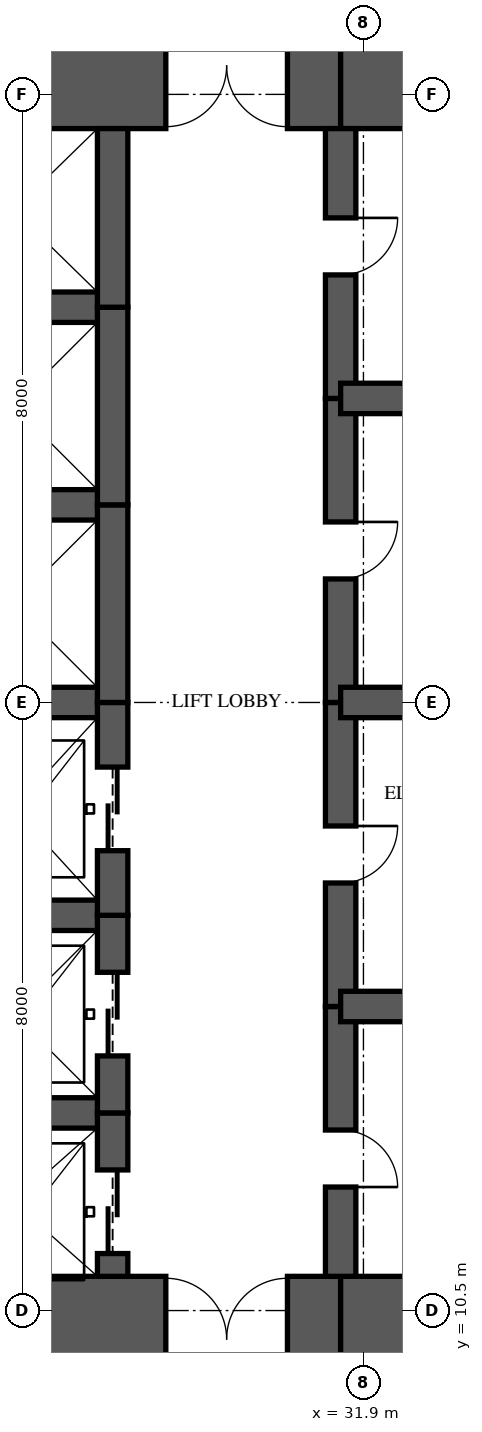
"""IFC4 building model, lengths in metres.
Left out: names, types, materials, properties, quantities, classifications, styles, units other than length and angle.
Written with IfcOpenShell. Run it as: python <this file> out.ifc"""

import sys

from ifc_helpers import new_model, si_unit, direction, frame, frame_2d, origin, place, context, subcontext, project, spatial, rectangle, extrude, element, fill, save


model = new_model("IFC4")
c1 = context("Model", 3, precision=1e-05, world=origin(), true_north=direction((0.0, 1.0)))
c2 = subcontext(c1, "Body", "Model", "MODEL_VIEW")
j1 = project(units=[si_unit("LENGTHUNIT", "METRE"), si_unit("PLANEANGLEUNIT", "RADIAN")], contexts=[c1])
p1 = place(None, origin())
s1 = spatial("IfcSite", under=j1, at=p1, CompositionType="ELEMENT")
p2 = place(p1, origin())
s2 = spatial("IfcBuilding", under=s1, at=p2, CompositionType="ELEMENT")
p3 = place(p2, frame((0.0, 0.0, 47.8)))
s3 = spatial("IfcBuildingStorey", under=s2, at=p3, CompositionType="ELEMENT", Elevation=47.8)
p4 = place(p3, frame((26.0, 10.125, 0.0), z_axis=(0.0, 0.0, 1.0), x_axis=(1.0, 0.0, 0.0)))
e1 = element("IfcWall", 1, at=p4, inside=s3, PredefinedType="SHEAR", context=c2, shape_type="SweptSolid", body=[
    extrude(rectangle(XDim=5.6, YDim=1.65, at=frame_2d((2.8, 0.0))), origin(), (0.0, 0.0, 1.0), 3.35),
])
p5 = place(p4, frame((3.3, 0.0, 0.0)))
e2 = element("IfcOpeningElement", 2, at=p5, cuts=e1, PredefinedType="OPENING", context=c2, shape_type="SweptSolid", body=[
    extrude(rectangle(XDim=1.6, YDim=2.1, at=frame_2d((0.8, 1.05))), frame((0.0, 0.835, 0.0), z_axis=(0.0, -1.0, 0.0), x_axis=(1.0, 0.0, 0.0)), (0.0, 0.0, 1.0), 1.67),
])
for number, where, z_axis, x_axis in (
    (3, (31.6, 10.125, 0.0), (0.0, 0.0, 1.0), (1.0, 0.0, 0.0)),
    (4, (35.9, 26.875, 0.0), (0.0, 0.0, 1.0), (-1.0, 0.0, 0.0)),
):
    element("IfcWall", number, at=place(p3, frame(where, z_axis=z_axis, x_axis=x_axis)), inside=s3, PredefinedType="SHEAR", context=c2, shape_type="SweptSolid", body=[
        extrude(rectangle(XDim=4.3, YDim=1.65, at=frame_2d((2.15, 0.0))), origin(), (0.0, 0.0, 1.0), 3.35),
    ])
p6 = place(p3, frame((31.6, 26.875, 0.0), z_axis=(0.0, 0.0, 1.0), x_axis=(-1.0, 0.0, 0.0)))
e5 = element("IfcWall", 5, at=p6, inside=s3, PredefinedType="SHEAR", context=c2, shape_type="SweptSolid", body=[
    extrude(rectangle(XDim=5.6, YDim=1.65, at=frame_2d((2.8, 0.0))), origin(), (0.0, 0.0, 1.0), 3.35),
])
p7 = place(p6, frame((0.7, 0.0, 0.0)))
e6 = element("IfcOpeningElement", 6, at=p7, cuts=e5, PredefinedType="OPENING", context=c2, shape_type="SweptSolid", body=[
    extrude(rectangle(XDim=1.6, YDim=2.1, at=frame_2d((0.8, 1.05))), frame((0.0, 0.835, 0.0), z_axis=(0.0, -1.0, 0.0), x_axis=(1.0, 0.0, 0.0)), (0.0, 0.0, 1.0), 1.67),
])
p8 = place(p3, frame((28.6, 10.95, 0.0), z_axis=(0.0, 0.0, 1.0), x_axis=(0.0, 1.0, 0.0)))
e7 = element("IfcWall", 7, at=p8, inside=s3, PredefinedType="SHEAR", context=c2, shape_type="SweptSolid", body=[
    extrude(rectangle(XDim=2.15, YDim=0.4, at=frame_2d((1.075, 0.0))), origin(), (0.0, 0.0, 1.0), 3.35),
])
p9 = place(p8, frame((0.3, 0.0, 0.0)))
e8 = element("IfcOpeningElement", 8, at=p9, cuts=e7, PredefinedType="OPENING", context=c2, shape_type="SweptSolid", body=[
    extrude(rectangle(XDim=1.1, YDim=2.1, at=frame_2d((0.55, 1.05))), frame((0.0, 0.21, 0.0), z_axis=(0.0, -1.0, 0.0), x_axis=(1.0, 0.0, 0.0)), (0.0, 0.0, 1.0), 0.42),
])
p10 = place(p3, frame((28.6, 13.1, 0.0), z_axis=(0.0, 0.0, 1.0), x_axis=(0.0, 1.0, 0.0)))
e9 = element("IfcWall", 9, at=p10, inside=s3, PredefinedType="SHEAR", context=c2, shape_type="SweptSolid", body=[
    extrude(rectangle(XDim=2.6, YDim=0.4, at=frame_2d((1.3, 0.0))), origin(), (0.0, 0.0, 1.0), 3.35),
])
p11 = place(p10, frame((0.75, 0.0, 0.0)))
e10 = element("IfcOpeningElement", 10, at=p11, cuts=e9, PredefinedType="OPENING", context=c2, shape_type="SweptSolid", body=[
    extrude(rectangle(XDim=1.1, YDim=2.1, at=frame_2d((0.55, 1.05))), frame((0.0, 0.21, 0.0), z_axis=(0.0, -1.0, 0.0), x_axis=(1.0, 0.0, 0.0)), (0.0, 0.0, 1.0), 0.42),
])
p12 = place(p3, frame((28.6, 15.7, 0.0), z_axis=(0.0, 0.0, 1.0), x_axis=(0.0, 1.0, 0.0)))
e11 = element("IfcWall", 11, at=p12, inside=s3, PredefinedType="SHEAR", context=c2, shape_type="SweptSolid", body=[
    extrude(rectangle(XDim=2.8, YDim=0.4, at=frame_2d((1.4, 0.0))), origin(), (0.0, 0.0, 1.0), 3.35),
])
p13 = place(p12, frame((0.85, 0.0, 0.0)))
e12 = element("IfcOpeningElement", 12, at=p13, cuts=e11, PredefinedType="OPENING", context=c2, shape_type="SweptSolid", body=[
    extrude(rectangle(XDim=1.1, YDim=2.1, at=frame_2d((0.55, 1.05))), frame((0.0, 0.21, 0.0), z_axis=(0.0, -1.0, 0.0), x_axis=(1.0, 0.0, 0.0)), (0.0, 0.0, 1.0), 0.42),
])
p14 = place(p3, frame((28.6, 18.5, 0.0), z_axis=(0.0, 0.0, 1.0), x_axis=(0.0, 1.0, 0.0)))
e13 = element("IfcWall", 13, at=p14, inside=s3, PredefinedType="SHEAR", context=c2, shape_type="SweptSolid", body=[
    extrude(rectangle(XDim=2.6, YDim=0.4, at=frame_2d((1.3, 0.0))), origin(), (0.0, 0.0, 1.0), 3.35),
])
p15 = place(p3, frame((28.6, 21.1, 0.0), z_axis=(0.0, 0.0, 1.0), x_axis=(0.0, 1.0, 0.0)))
e14 = element("IfcWall", 14, at=p15, inside=s3, PredefinedType="SHEAR", context=c2, shape_type="SweptSolid", body=[
    extrude(rectangle(XDim=2.6, YDim=0.4, at=frame_2d((1.3, 0.0))), origin(), (0.0, 0.0, 1.0), 3.35),
])
p16 = place(p3, frame((28.6, 23.7, 0.0), z_axis=(0.0, 0.0, 1.0), x_axis=(0.0, 1.0, 0.0)))
e15 = element("IfcWall", 15, at=p16, inside=s3, PredefinedType="SHEAR", context=c2, shape_type="SweptSolid", body=[
    extrude(rectangle(XDim=2.35, YDim=0.4, at=frame_2d((1.175, 0.0))), origin(), (0.0, 0.0, 1.0), 3.35),
])
p17 = place(p3, frame((31.6, 10.95, 0.0), z_axis=(0.0, 0.0, 1.0), x_axis=(0.0, 1.0, 0.0)))
e16 = element("IfcWall", 16, at=p17, inside=s3, PredefinedType="SHEAR", context=c2, shape_type="SweptSolid", body=[
    extrude(rectangle(XDim=3.55, YDim=0.4, at=frame_2d((1.775, 0.0))), origin(), (0.0, 0.0, 1.0), 3.35),
])
p18 = place(p17, frame((1.175, 0.0, 0.0)))
e17 = element("IfcOpeningElement", 17, at=p18, cuts=e16, PredefinedType="OPENING", context=c2, shape_type="SweptSolid", body=[
    extrude(rectangle(XDim=0.75, YDim=2.1, at=frame_2d((0.375, 1.05))), frame((0.0, 0.21, 0.0), z_axis=(0.0, -1.0, 0.0), x_axis=(1.0, 0.0, 0.0)), (0.0, 0.0, 1.0), 0.42),
])
p19 = place(p3, frame((31.6, 14.5, 0.0), z_axis=(0.0, 0.0, 1.0), x_axis=(0.0, 1.0, 0.0)))
e18 = element("IfcWall", 18, at=p19, inside=s3, PredefinedType="SHEAR", context=c2, shape_type="SweptSolid", body=[
    extrude(rectangle(XDim=4.0, YDim=0.4, at=frame_2d((2.0, 0.0))), origin(), (0.0, 0.0, 1.0), 3.35),
])
p20 = place(p19, frame((1.625, 0.0, 0.0)))
e19 = element("IfcOpeningElement", 19, at=p20, cuts=e18, PredefinedType="OPENING", context=c2, shape_type="SweptSolid", body=[
    extrude(rectangle(XDim=0.75, YDim=2.1, at=frame_2d((0.375, 1.05))), frame((0.0, 0.21, 0.0), z_axis=(0.0, -1.0, 0.0), x_axis=(1.0, 0.0, 0.0)), (0.0, 0.0, 1.0), 0.42),
])
p21 = place(p3, frame((31.6, 18.5, 0.0), z_axis=(0.0, 0.0, 1.0), x_axis=(0.0, 1.0, 0.0)))
e20 = element("IfcWall", 20, at=p21, inside=s3, PredefinedType="SHEAR", context=c2, shape_type="SweptSolid", body=[
    extrude(rectangle(XDim=4.0, YDim=0.4, at=frame_2d((2.0, 0.0))), origin(), (0.0, 0.0, 1.0), 3.35),
])
p22 = place(p21, frame((1.625, 0.0, 0.0)))
e21 = element("IfcOpeningElement", 21, at=p22, cuts=e20, PredefinedType="OPENING", context=c2, shape_type="SweptSolid", body=[
    extrude(rectangle(XDim=0.75, YDim=2.1, at=frame_2d((0.375, 1.05))), frame((0.0, 0.21, 0.0), z_axis=(0.0, -1.0, 0.0), x_axis=(1.0, 0.0, 0.0)), (0.0, 0.0, 1.0), 0.42),
])
p23 = place(p3, frame((31.6, 22.5, 0.0), z_axis=(0.0, 0.0, 1.0), x_axis=(0.0, 1.0, 0.0)))
e22 = element("IfcWall", 22, at=p23, inside=s3, PredefinedType="SHEAR", context=c2, shape_type="SweptSolid", body=[
    extrude(rectangle(XDim=3.55, YDim=0.4, at=frame_2d((1.775, 0.0))), origin(), (0.0, 0.0, 1.0), 3.35),
])
p24 = place(p23, frame((1.625, 0.0, 0.0)))
e23 = element("IfcOpeningElement", 23, at=p24, cuts=e22, PredefinedType="OPENING", context=c2, shape_type="SweptSolid", body=[
    extrude(rectangle(XDim=0.75, YDim=2.1, at=frame_2d((0.375, 1.05))), frame((0.0, 0.21, 0.0), z_axis=(0.0, -1.0, 0.0), x_axis=(1.0, 0.0, 0.0)), (0.0, 0.0, 1.0), 0.42),
])
for number, where, z_axis, x_axis in (
    (24, (26.0, 13.1, 0.0), (0.0, 0.0, 1.0), (1.0, 0.0, 0.0)),
    (25, (26.0, 15.7, 0.0), (0.0, 0.0, 1.0), (1.0, 0.0, 0.0)),
    (26, (26.0, 18.5, 0.0), (0.0, 0.0, 1.0), (1.0, 0.0, 0.0)),
    (27, (26.0, 21.1, 0.0), (0.0, 0.0, 1.0), (1.0, 0.0, 0.0)),
    (28, (26.0, 23.7, 0.0), (0.0, 0.0, 1.0), (1.0, 0.0, 0.0)),
):
    element("IfcWall", number, at=place(p3, frame(where, z_axis=z_axis, x_axis=x_axis)), inside=s3, PredefinedType="SHEAR", context=c2, shape_type="SweptSolid", body=[
        extrude(rectangle(XDim=2.6, YDim=0.4, at=frame_2d((1.3, 0.0))), origin(), (0.0, 0.0, 1.0), 3.35),
    ])
for number, where, z_axis, x_axis in (
    (29, (31.6, 14.5, 0.0), (0.0, 0.0, 1.0), (1.0, 0.0, 0.0)),
    (30, (31.6, 18.5, 0.0), (0.0, 0.0, 1.0), (1.0, 0.0, 0.0)),
    (31, (31.6, 22.5, 0.0), (0.0, 0.0, 1.0), (1.0, 0.0, 0.0)),
):
    element("IfcWall", number, at=place(p3, frame(where, z_axis=z_axis, x_axis=x_axis)), inside=s3, PredefinedType="SHEAR", context=c2, shape_type="SweptSolid", body=[
        extrude(rectangle(XDim=4.3, YDim=0.4, at=frame_2d((2.15, 0.0))), origin(), (0.0, 0.0, 1.0), 3.35),
    ])
p25 = place(p9, origin())
e32 = element("IfcDoor", 32, at=p25, inside=s3, OperationType="SLIDING_TO_LEFT", PredefinedType="DOOR", context=c2, shape_type="SweptSolid", body=[
    extrude(rectangle(XDim=1.1, YDim=2.1, at=frame_2d((0.55, 1.05))), frame((0.0, 0.025, 0.0), z_axis=(0.0, -1.0, 0.0), x_axis=(1.0, 0.0, 0.0)), (0.0, 0.0, 1.0), 0.05),
])
fill(e8, e32)
p26 = place(p11, origin())
e33 = element("IfcDoor", 33, at=p26, inside=s3, OperationType="SLIDING_TO_LEFT", PredefinedType="DOOR", context=c2, shape_type="SweptSolid", body=[
    extrude(rectangle(XDim=1.1, YDim=2.1, at=frame_2d((0.55, 1.05))), frame((0.0, 0.025, 0.0), z_axis=(0.0, -1.0, 0.0), x_axis=(1.0, 0.0, 0.0)), (0.0, 0.0, 1.0), 0.05),
])
fill(e10, e33)
p27 = place(p13, origin())
e34 = element("IfcDoor", 34, at=p27, inside=s3, OperationType="SLIDING_TO_LEFT", PredefinedType="DOOR", context=c2, shape_type="SweptSolid", body=[
    extrude(rectangle(XDim=1.1, YDim=2.1, at=frame_2d((0.55, 1.05))), frame((0.0, 0.025, 0.0), z_axis=(0.0, -1.0, 0.0), x_axis=(1.0, 0.0, 0.0)), (0.0, 0.0, 1.0), 0.05),
])
fill(e12, e34)
p28 = place(p5, origin())
e35 = element("IfcDoor", 35, at=p28, inside=s3, OperationType="DOUBLE_DOOR_SINGLE_SWING", PredefinedType="DOOR", context=c2, shape_type="SweptSolid", body=[
    extrude(rectangle(XDim=1.6, YDim=2.1, at=frame_2d((0.8, 1.05))), frame((0.0, 0.025, 0.0), z_axis=(0.0, -1.0, 0.0), x_axis=(1.0, 0.0, 0.0)), (0.0, 0.0, 1.0), 0.05),
])
fill(e2, e35)
p29 = place(p7, origin())
e36 = element("IfcDoor", 36, at=p29, inside=s3, OperationType="DOUBLE_DOOR_SINGLE_SWING", PredefinedType="DOOR", context=c2, shape_type="SweptSolid", body=[
    extrude(rectangle(XDim=1.6, YDim=2.1, at=frame_2d((0.8, 1.05))), frame((0.0, 0.025, 0.0), z_axis=(0.0, -1.0, 0.0), x_axis=(1.0, 0.0, 0.0)), (0.0, 0.0, 1.0), 0.05),
])
fill(e6, e36)
p30 = place(p18, frame((0.75, 0.0, 0.0), z_axis=(0.0, 0.0, 1.0), x_axis=(-1.0, 0.0, 0.0)))
e37 = element("IfcDoor", 37, at=p30, inside=s3, OperationType="SINGLE_SWING_RIGHT", PredefinedType="DOOR", context=c2, shape_type="SweptSolid", body=[
    extrude(rectangle(XDim=0.75, YDim=2.1, at=frame_2d((0.375, 1.05))), frame((0.0, 0.025, 0.0), z_axis=(0.0, -1.0, 0.0), x_axis=(1.0, 0.0, 0.0)), (0.0, 0.0, 1.0), 0.05),
])
fill(e17, e37)
p31 = place(p20, frame((0.75, 0.0, 0.0), z_axis=(0.0, 0.0, 1.0), x_axis=(-1.0, 0.0, 0.0)))
e38 = element("IfcDoor", 38, at=p31, inside=s3, OperationType="SINGLE_SWING_LEFT", PredefinedType="DOOR", context=c2, shape_type="SweptSolid", body=[
    extrude(rectangle(XDim=0.75, YDim=2.1, at=frame_2d((0.375, 1.05))), frame((0.0, 0.025, 0.0), z_axis=(0.0, -1.0, 0.0), x_axis=(1.0, 0.0, 0.0)), (0.0, 0.0, 1.0), 0.05),
])
fill(e19, e38)
p32 = place(p22, frame((0.75, 0.0, 0.0), z_axis=(0.0, 0.0, 1.0), x_axis=(-1.0, 0.0, 0.0)))
e39 = element("IfcDoor", 39, at=p32, inside=s3, OperationType="SINGLE_SWING_LEFT", PredefinedType="DOOR", context=c2, shape_type="SweptSolid", body=[
    extrude(rectangle(XDim=0.75, YDim=2.1, at=frame_2d((0.375, 1.05))), frame((0.0, 0.025, 0.0), z_axis=(0.0, -1.0, 0.0), x_axis=(1.0, 0.0, 0.0)), (0.0, 0.0, 1.0), 0.05),
])
fill(e21, e39)
p33 = place(p24, frame((0.75, 0.0, 0.0), z_axis=(0.0, 0.0, 1.0), x_axis=(-1.0, 0.0, 0.0)))
e40 = element("IfcDoor", 40, at=p33, inside=s3, OperationType="SINGLE_SWING_LEFT", PredefinedType="DOOR", context=c2, shape_type="SweptSolid", body=[
    extrude(rectangle(XDim=0.75, YDim=2.1, at=frame_2d((0.375, 1.05))), frame((0.0, 0.025, 0.0), z_axis=(0.0, -1.0, 0.0), x_axis=(1.0, 0.0, 0.0)), (0.0, 0.0, 1.0), 0.05),
])
fill(e23, e40)
save(model, sys.argv[1])
